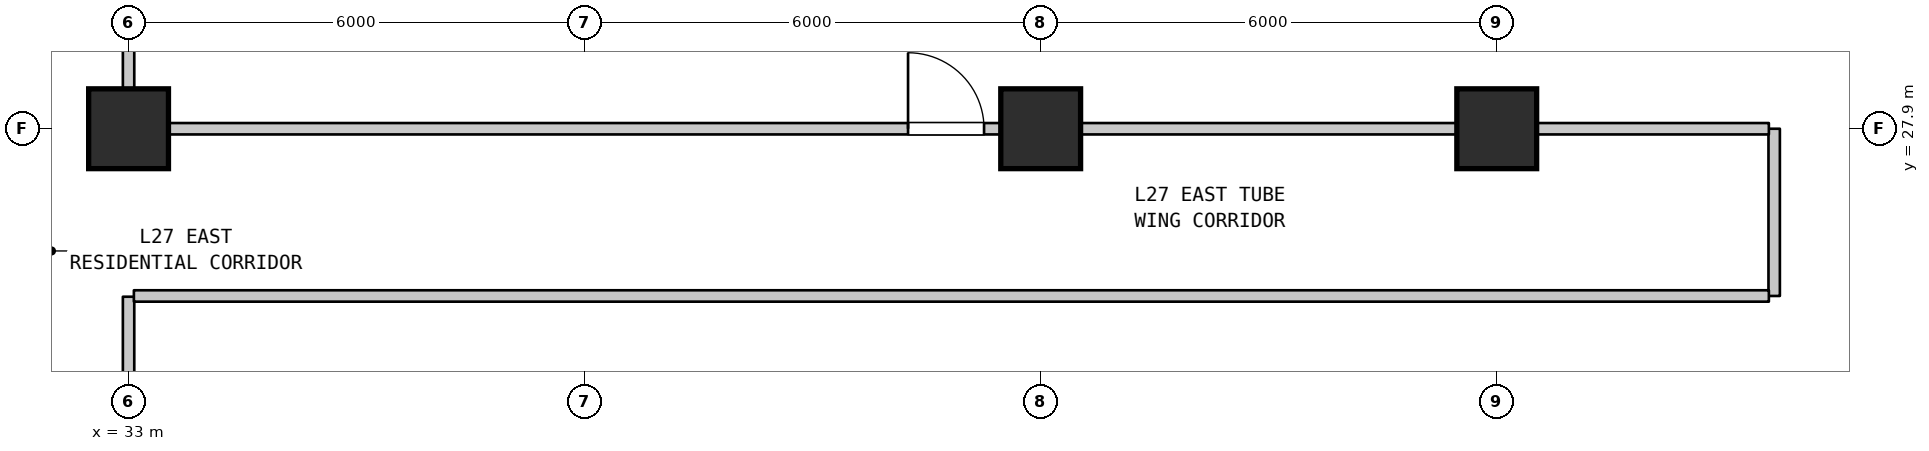
"""IFC4 building model, lengths in metres.
Left out: names, types, materials, properties, quantities, classifications, styles, units other than length and angle.
Written with IfcOpenShell. Run it as: python <this file> out.ifc"""

import sys

from ifc_helpers import new_model, si_unit, direction, frame, frame_2d, origin, origin_2d, place, context, subcontext, project, spatial, rectangle, extrude, element, fill, save


model = new_model("IFC4")
c1 = context("Model", 3, precision=1e-05, world=origin(), true_north=direction((0.0, 1.0)))
c2 = subcontext(c1, "Body", "Model", "MODEL_VIEW")
j1 = project(units=[si_unit("LENGTHUNIT", "METRE"), si_unit("PLANEANGLEUNIT", "RADIAN")], contexts=[c1])
p1 = place(None, origin())
s1 = spatial("IfcSite", under=j1, at=p1, CompositionType="ELEMENT")
p2 = place(p1, origin())
s2 = spatial("IfcBuilding", under=s1, at=p2, CompositionType="ELEMENT")
p3 = place(p2, frame((0.0, 0.0, 113.1)))
s3 = spatial("IfcBuildingStorey", under=s2, at=p3, CompositionType="ELEMENT", Elevation=113.1)
for number, where, z_axis, x_axis in (
    (1, (33.0, 27.9, 0.0), (0.0, 0.0, 1.0), (1.0, 0.0, 0.0)),
    (2, (45.0, 27.9, 0.0), (0.0, 0.0, 1.0), (1.0, 0.0, 0.0)),
    (3, (51.0, 27.9, 0.0), (0.0, 0.0, 1.0), (1.0, 0.0, 0.0)),
):
    element("IfcColumn", number, at=place(p3, frame(where, z_axis=z_axis, x_axis=x_axis)), inside=s3, PredefinedType="COLUMN", context=c2, shape_type="SweptSolid", body=[
        extrude(rectangle(XDim=1.05, YDim=1.05, at=origin_2d()), origin(), (0.0, 0.0, 1.0), 3.7),
    ])
p4 = place(p3, frame((33.0, 19.51, 0.0), z_axis=(0.0, 0.0, 1.0), x_axis=(0.0, 1.0, 0.0)))
e4 = element("IfcWall", 4, at=p4, inside=s3, PredefinedType="STANDARD", context=c2, shape_type="SweptSolid", body=[
    extrude(rectangle(XDim=6.18, YDim=0.15, at=frame_2d((3.09, 0.0))), origin(), (0.0, 0.0, 1.0), 2.935),
])
p5 = place(p3, frame((33.0, 27.91, 0.0), z_axis=(0.0, 0.0, 1.0), x_axis=(0.0, 1.0, 0.0)))
e5 = element("IfcWall", 5, at=p5, inside=s3, PredefinedType="STANDARD", context=c2, shape_type="SweptSolid", body=[
    extrude(rectangle(XDim=9.98, YDim=0.15, at=frame_2d((4.99, 0.0))), origin(), (0.0, 0.0, 1.0), 2.885),
])
p6 = place(p3, frame((54.65, 25.7, 0.0), z_axis=(0.0, 0.0, 1.0), x_axis=(0.0, 1.0, 0.0)))
e6 = element("IfcWall", 6, at=p6, inside=s3, PredefinedType="STANDARD", context=c2, shape_type="SweptSolid", body=[
    extrude(rectangle(XDim=2.2, YDim=0.15, at=frame_2d((1.1, 0.0))), origin(), (0.0, 0.0, 1.0), 3.385),
])
p7 = place(p3, frame((33.07, 25.7, 0.0), z_axis=(0.0, 0.0, 1.0), x_axis=(1.0, 0.0, 0.0)))
e7 = element("IfcWall", 7, at=p7, inside=s3, PredefinedType="STANDARD", context=c2, shape_type="SweptSolid", body=[
    extrude(rectangle(XDim=21.51, YDim=0.15, at=frame_2d((10.755, 0.0))), origin(), (0.0, 0.0, 1.0), 3.385),
])
p8 = place(p3, frame((33.07, 27.9, 0.0), z_axis=(0.0, 0.0, 1.0), x_axis=(1.0, 0.0, 0.0)))
e8 = element("IfcWall", 8, at=p8, inside=s3, PredefinedType="STANDARD", context=c2, shape_type="SweptSolid", body=[
    extrude(rectangle(XDim=11.93, YDim=0.15, at=frame_2d((5.965, 0.0))), origin(), (0.0, 0.0, 1.0), 2.885),
])
p9 = place(p8, frame((10.185, 0.0, 0.0)))
e9 = element("IfcOpeningElement", 9, at=p9, cuts=e8, PredefinedType="OPENING", context=c2, shape_type="SweptSolid", body=[
    extrude(rectangle(XDim=1.0, YDim=2.15, at=frame_2d((0.5, 1.075))), frame((0.0, 0.085, 0.0), z_axis=(0.0, -1.0, 0.0), x_axis=(1.0, 0.0, 0.0)), (0.0, 0.0, 1.0), 0.17),
])
p10 = place(p3, frame((45.0, 27.9, 0.0), z_axis=(0.0, 0.0, 1.0), x_axis=(1.0, 0.0, 0.0)))
e10 = element("IfcWall", 10, at=p10, inside=s3, PredefinedType="STANDARD", context=c2, shape_type="SweptSolid", body=[
    extrude(rectangle(XDim=9.58, YDim=0.15, at=frame_2d((4.79, 0.0))), origin(), (0.0, 0.0, 1.0), 2.935),
])
p11 = place(p9, origin())
e11 = element("IfcDoor", 11, at=p11, inside=s3, OperationType="SINGLE_SWING_LEFT", PredefinedType="DOOR", context=c2, shape_type="SweptSolid", body=[
    extrude(rectangle(XDim=1.0, YDim=2.15, at=frame_2d((0.5, 1.075))), frame((0.0, 0.025, 0.0), z_axis=(0.0, -1.0, 0.0), x_axis=(1.0, 0.0, 0.0)), (0.0, 0.0, 1.0), 0.05),
])
fill(e9, e11)
save(model, sys.argv[1])
